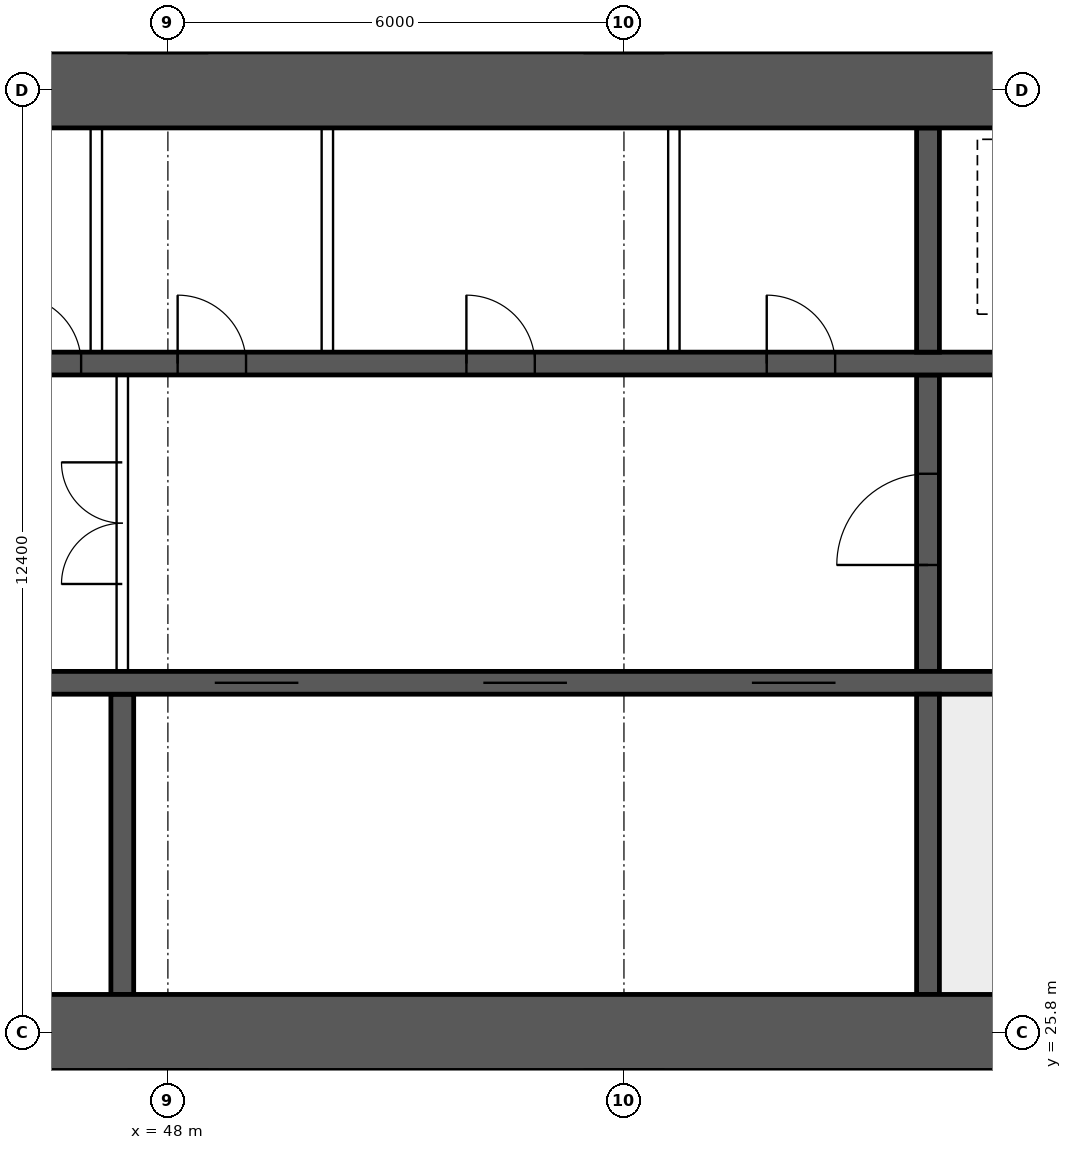
"""IFC4 building model, lengths in metres.
Left out: names, types, materials, properties, quantities, classifications, styles, units other than length and angle.
Written with IfcOpenShell. Run it as: python <this file> out.ifc"""

import sys

from ifc_helpers import new_model, si_unit, direction, frame, frame_2d, origin, place, context, subcontext, project, spatial, rectangle, extrude, element, fill, save


model = new_model("IFC4")
c1 = context("Model", 3, precision=1e-05, world=origin(), true_north=direction((0.0, 1.0)))
c2 = subcontext(c1, "Body", "Model", "MODEL_VIEW")
j1 = project(units=[si_unit("LENGTHUNIT", "METRE"), si_unit("PLANEANGLEUNIT", "RADIAN")], contexts=[c1])
p1 = place(None, origin())
s1 = spatial("IfcSite", under=j1, at=p1, CompositionType="ELEMENT")
p2 = place(p1, origin())
s2 = spatial("IfcBuilding", under=s1, at=p2, CompositionType="ELEMENT")
p3 = place(p2, frame((0.0, 0.0, 53.95)))
s3 = spatial("IfcBuildingStorey", under=s2, at=p3, CompositionType="ELEMENT", Elevation=53.95)
for number, where, z_axis, x_axis in (
    (1, (18.0, 25.8, 0.0), (0.0, 0.0, 1.0), (1.0, 0.0, 0.0)),
    (2, (18.0, 38.2, 0.0), (0.0, 0.0, 1.0), (1.0, 0.0, 0.0)),
):
    element("IfcWall", number, at=place(p3, frame(where, z_axis=z_axis, x_axis=x_axis)), inside=s3, PredefinedType="SHEAR", context=c2, shape_type="SweptSolid", body=[
        extrude(rectangle(XDim=48.0, YDim=1.0, at=frame_2d((24.0, 0.0))), origin(), (0.0, 0.0, 1.0), 3.75),
    ])
p4 = place(p3, frame((18.5, 30.4, 0.0), z_axis=(0.0, 0.0, 1.0), x_axis=(1.0, 0.0, 0.0)))
e3 = element("IfcWall", 3, at=p4, inside=s3, PredefinedType="SHEAR", context=c2, shape_type="SweptSolid", body=[
    extrude(rectangle(XDim=47.0, YDim=0.3, at=frame_2d((23.5, 0.0))), origin(), (0.0, 0.0, 1.0), 3.75),
])
p5 = place(p4, frame((0.4, 0.0, 0.0)))
e4 = element("IfcOpeningElement", 4, at=p5, cuts=e3, PredefinedType="OPENING", context=c2, shape_type="SweptSolid", body=[
    extrude(rectangle(XDim=1.0, YDim=2.1, at=frame_2d((0.5, 1.05))), frame((0.0, 0.16, 0.0), z_axis=(0.0, -1.0, 0.0), x_axis=(1.0, 0.0, 0.0)), (0.0, 0.0, 1.0), 0.32),
])
p6 = place(p4, frame((45.6, 0.0, 0.0)))
e5 = element("IfcOpeningElement", 5, at=p6, cuts=e3, PredefinedType="OPENING", context=c2, shape_type="SweptSolid", body=[
    extrude(rectangle(XDim=1.0, YDim=2.1, at=frame_2d((0.5, 1.05))), frame((0.0, 0.16, 0.0), z_axis=(0.0, -1.0, 0.0), x_axis=(1.0, 0.0, 0.0)), (0.0, 0.0, 1.0), 0.32),
])
p7 = place(p4, frame((8.25, 0.0, 0.0)))
e6 = element("IfcOpeningElement", 6, at=p7, cuts=e3, PredefinedType="OPENING", context=c2, shape_type="SweptSolid", body=[
    extrude(rectangle(XDim=1.1, YDim=2.1, at=frame_2d((0.55, 1.05))), frame((0.0, 0.16, 0.0), z_axis=(0.0, -1.0, 0.0), x_axis=(1.0, 0.0, 0.0)), (0.0, 0.0, 1.0), 0.32),
])
p8 = place(p4, frame((10.85, 0.0, 0.0)))
e7 = element("IfcOpeningElement", 7, at=p8, cuts=e3, PredefinedType="OPENING", context=c2, shape_type="SweptSolid", body=[
    extrude(rectangle(XDim=1.1, YDim=2.1, at=frame_2d((0.55, 1.05))), frame((0.0, 0.16, 0.0), z_axis=(0.0, -1.0, 0.0), x_axis=(1.0, 0.0, 0.0)), (0.0, 0.0, 1.0), 0.32),
])
p9 = place(p4, frame((13.45, 0.0, 0.0)))
e8 = element("IfcOpeningElement", 8, at=p9, cuts=e3, PredefinedType="OPENING", context=c2, shape_type="SweptSolid", body=[
    extrude(rectangle(XDim=1.1, YDim=2.1, at=frame_2d((0.55, 1.05))), frame((0.0, 0.16, 0.0), z_axis=(0.0, -1.0, 0.0), x_axis=(1.0, 0.0, 0.0)), (0.0, 0.0, 1.0), 0.32),
])
p10 = place(p4, frame((16.05, 0.0, 0.0)))
e9 = element("IfcOpeningElement", 9, at=p10, cuts=e3, PredefinedType="OPENING", context=c2, shape_type="SweptSolid", body=[
    extrude(rectangle(XDim=1.1, YDim=2.1, at=frame_2d((0.55, 1.05))), frame((0.0, 0.16, 0.0), z_axis=(0.0, -1.0, 0.0), x_axis=(1.0, 0.0, 0.0)), (0.0, 0.0, 1.0), 0.32),
])
p11 = place(p4, frame((30.117, 0.0, 0.0)))
e10 = element("IfcOpeningElement", 10, at=p11, cuts=e3, PredefinedType="OPENING", context=c2, shape_type="SweptSolid", body=[
    extrude(rectangle(XDim=1.1, YDim=2.1, at=frame_2d((0.55, 1.05))), frame((0.0, 0.16, 0.0), z_axis=(0.0, -1.0, 0.0), x_axis=(1.0, 0.0, 0.0)), (0.0, 0.0, 1.0), 0.32),
])
p12 = place(p4, frame((33.65, 0.0, 0.0)))
e11 = element("IfcOpeningElement", 11, at=p12, cuts=e3, PredefinedType="OPENING", context=c2, shape_type="SweptSolid", body=[
    extrude(rectangle(XDim=1.1, YDim=2.1, at=frame_2d((0.55, 1.05))), frame((0.0, 0.16, 0.0), z_axis=(0.0, -1.0, 0.0), x_axis=(1.0, 0.0, 0.0)), (0.0, 0.0, 1.0), 0.32),
])
p13 = place(p4, frame((37.183, 0.0, 0.0)))
e12 = element("IfcOpeningElement", 12, at=p13, cuts=e3, PredefinedType="OPENING", context=c2, shape_type="SweptSolid", body=[
    extrude(rectangle(XDim=1.1, YDim=2.1, at=frame_2d((0.55, 1.05))), frame((0.0, 0.16, 0.0), z_axis=(0.0, -1.0, 0.0), x_axis=(1.0, 0.0, 0.0)), (0.0, 0.0, 1.0), 0.32),
])
p14 = place(p3, frame((18.5, 34.6, 0.0), z_axis=(0.0, 0.0, 1.0), x_axis=(1.0, 0.0, 0.0)))
e13 = element("IfcWall", 13, at=p14, inside=s3, PredefinedType="SHEAR", context=c2, shape_type="SweptSolid", body=[
    extrude(rectangle(XDim=47.0, YDim=0.3, at=frame_2d((23.5, 0.0))), origin(), (0.0, 0.0, 1.0), 3.75),
])
p15 = place(p14, frame((0.9, 0.0, 0.0)))
e14 = element("IfcOpeningElement", 14, at=p15, cuts=e13, PredefinedType="OPENING", context=c2, shape_type="SweptSolid", body=[
    extrude(rectangle(XDim=1.1, YDim=2.1, at=frame_2d((0.55, 1.05))), frame((0.0, 0.16, 0.0), z_axis=(0.0, -1.0, 0.0), x_axis=(1.0, 0.0, 0.0)), (0.0, 0.0, 1.0), 0.32),
])
p16 = place(p14, frame((45.0, 0.0, 0.0)))
e15 = element("IfcOpeningElement", 15, at=p16, cuts=e13, PredefinedType="OPENING", context=c2, shape_type="SweptSolid", body=[
    extrude(rectangle(XDim=1.1, YDim=2.1, at=frame_2d((0.55, 1.05))), frame((0.0, 0.16, 0.0), z_axis=(0.0, -1.0, 0.0), x_axis=(1.0, 0.0, 0.0)), (0.0, 0.0, 1.0), 0.32),
])
p17 = place(p14, frame((4.1, 0.0, 0.0)))
e16 = element("IfcOpeningElement", 16, at=p17, cuts=e13, PredefinedType="OPENING", context=c2, shape_type="SweptSolid", body=[
    extrude(rectangle(XDim=0.9, YDim=2.1, at=frame_2d((0.45, 1.05))), frame((0.0, 0.16, 0.0), z_axis=(0.0, -1.0, 0.0), x_axis=(1.0, 0.0, 0.0)), (0.0, 0.0, 1.0), 0.32),
])
p18 = place(p14, frame((42.0, 0.0, 0.0)))
e17 = element("IfcOpeningElement", 17, at=p18, cuts=e13, PredefinedType="OPENING", context=c2, shape_type="SweptSolid", body=[
    extrude(rectangle(XDim=0.9, YDim=2.1, at=frame_2d((0.45, 1.05))), frame((0.0, 0.16, 0.0), z_axis=(0.0, -1.0, 0.0), x_axis=(1.0, 0.0, 0.0)), (0.0, 0.0, 1.0), 0.32),
])
p19 = place(p14, frame((8.875, 0.0, 0.0)))
e18 = element("IfcOpeningElement", 18, at=p19, cuts=e13, PredefinedType="OPENING", context=c2, shape_type="SweptSolid", body=[
    extrude(rectangle(XDim=0.9, YDim=2.1, at=frame_2d((0.45, 1.05))), frame((0.0, 0.16, 0.0), z_axis=(0.0, -1.0, 0.0), x_axis=(1.0, 0.0, 0.0)), (0.0, 0.0, 1.0), 0.32),
])
p20 = place(p14, frame((12.849, 0.0, 0.0)))
e19 = element("IfcOpeningElement", 19, at=p20, cuts=e13, PredefinedType="OPENING", context=c2, shape_type="SweptSolid", body=[
    extrude(rectangle(XDim=0.9, YDim=2.1, at=frame_2d((0.45, 1.05))), frame((0.0, 0.16, 0.0), z_axis=(0.0, -1.0, 0.0), x_axis=(1.0, 0.0, 0.0)), (0.0, 0.0, 1.0), 0.32),
])
p21 = place(p14, frame((16.496, 0.0, 0.0)))
e20 = element("IfcOpeningElement", 20, at=p21, cuts=e13, PredefinedType="OPENING", context=c2, shape_type="SweptSolid", body=[
    extrude(rectangle(XDim=0.9, YDim=2.1, at=frame_2d((0.45, 1.05))), frame((0.0, 0.16, 0.0), z_axis=(0.0, -1.0, 0.0), x_axis=(1.0, 0.0, 0.0)), (0.0, 0.0, 1.0), 0.32),
])
p22 = place(p14, frame((20.255, 0.0, 0.0)))
e21 = element("IfcOpeningElement", 21, at=p22, cuts=e13, PredefinedType="OPENING", context=c2, shape_type="SweptSolid", body=[
    extrude(rectangle(XDim=0.9, YDim=2.1, at=frame_2d((0.45, 1.05))), frame((0.0, 0.16, 0.0), z_axis=(0.0, -1.0, 0.0), x_axis=(1.0, 0.0, 0.0)), (0.0, 0.0, 1.0), 0.32),
])
p23 = place(p14, frame((24.661, 0.0, 0.0)))
e22 = element("IfcOpeningElement", 22, at=p23, cuts=e13, PredefinedType="OPENING", context=c2, shape_type="SweptSolid", body=[
    extrude(rectangle(XDim=0.9, YDim=2.1, at=frame_2d((0.45, 1.05))), frame((0.0, 0.16, 0.0), z_axis=(0.0, -1.0, 0.0), x_axis=(1.0, 0.0, 0.0)), (0.0, 0.0, 1.0), 0.32),
])
p24 = place(p14, frame((27.458, 0.0, 0.0)))
e23 = element("IfcOpeningElement", 23, at=p24, cuts=e13, PredefinedType="OPENING", context=c2, shape_type="SweptSolid", body=[
    extrude(rectangle(XDim=0.9, YDim=2.1, at=frame_2d((0.45, 1.05))), frame((0.0, 0.16, 0.0), z_axis=(0.0, -1.0, 0.0), x_axis=(1.0, 0.0, 0.0)), (0.0, 0.0, 1.0), 0.32),
])
p25 = place(p14, frame((29.628, 0.0, 0.0)))
e24 = element("IfcOpeningElement", 24, at=p25, cuts=e13, PredefinedType="OPENING", context=c2, shape_type="SweptSolid", body=[
    extrude(rectangle(XDim=0.9, YDim=2.1, at=frame_2d((0.45, 1.05))), frame((0.0, 0.16, 0.0), z_axis=(0.0, -1.0, 0.0), x_axis=(1.0, 0.0, 0.0)), (0.0, 0.0, 1.0), 0.32),
])
p26 = place(p14, frame((33.427, 0.0, 0.0)))
e25 = element("IfcOpeningElement", 25, at=p26, cuts=e13, PredefinedType="OPENING", context=c2, shape_type="SweptSolid", body=[
    extrude(rectangle(XDim=0.9, YDim=2.1, at=frame_2d((0.45, 1.05))), frame((0.0, 0.16, 0.0), z_axis=(0.0, -1.0, 0.0), x_axis=(1.0, 0.0, 0.0)), (0.0, 0.0, 1.0), 0.32),
])
p27 = place(p14, frame((37.378, 0.0, 0.0)))
e26 = element("IfcOpeningElement", 26, at=p27, cuts=e13, PredefinedType="OPENING", context=c2, shape_type="SweptSolid", body=[
    extrude(rectangle(XDim=0.9, YDim=2.1, at=frame_2d((0.45, 1.05))), frame((0.0, 0.16, 0.0), z_axis=(0.0, -1.0, 0.0), x_axis=(1.0, 0.0, 0.0)), (0.0, 0.0, 1.0), 0.32),
])
p28 = place(p3, frame((58.0, 26.3, 0.0), z_axis=(0.0, 0.0, 1.0), x_axis=(0.0, 1.0, 0.0)))
e27 = element("IfcWall", 27, at=p28, inside=s3, PredefinedType="SHEAR", context=c2, shape_type="SweptSolid", body=[
    extrude(rectangle(XDim=3.95, YDim=0.3, at=frame_2d((1.975, 0.0))), origin(), (0.0, 0.0, 1.0), 3.75),
])
p29 = place(p3, frame((58.0, 30.55, 0.0), z_axis=(0.0, 0.0, 1.0), x_axis=(0.0, 1.0, 0.0)))
e28 = element("IfcWall", 28, at=p29, inside=s3, PredefinedType="SHEAR", context=c2, shape_type="SweptSolid", body=[
    extrude(rectangle(XDim=3.9, YDim=0.3, at=frame_2d((1.95, 0.0))), origin(), (0.0, 0.0, 1.0), 3.75),
])
p30 = place(p29, frame((1.4, 0.0, 0.0)))
e29 = element("IfcOpeningElement", 29, at=p30, cuts=e28, PredefinedType="OPENING", context=c2, shape_type="SweptSolid", body=[
    extrude(rectangle(XDim=1.2, YDim=2.1, at=frame_2d((0.6, 1.05))), frame((0.0, 0.16, 0.0), z_axis=(0.0, -1.0, 0.0), x_axis=(1.0, 0.0, 0.0)), (0.0, 0.0, 1.0), 0.32),
])
p31 = place(p3, frame((58.0, 34.75, 0.0), z_axis=(0.0, 0.0, 1.0), x_axis=(0.0, 1.0, 0.0)))
e30 = element("IfcWall", 30, at=p31, inside=s3, PredefinedType="SHEAR", context=c2, shape_type="SweptSolid", body=[
    extrude(rectangle(XDim=2.95, YDim=0.3, at=frame_2d((1.475, 0.0))), origin(), (0.0, 0.0, 1.0), 3.75),
])
p32 = place(p3, frame((47.4, 26.3, 0.0), z_axis=(0.0, 0.0, 1.0), x_axis=(0.0, 1.0, 0.0)))
e31 = element("IfcWall", 31, at=p32, inside=s3, PredefinedType="SHEAR", context=c2, shape_type="SweptSolid", body=[
    extrude(rectangle(XDim=3.95, YDim=0.3, at=frame_2d((1.975, 0.0))), origin(), (0.0, 0.0, 1.0), 3.75),
])
p33 = place(p3, frame((47.4, 30.55, 0.0), z_axis=(0.0, 0.0, 1.0), x_axis=(0.0, 1.0, 0.0)))
e32 = element("IfcWall", 32, at=p33, inside=s3, PredefinedType="SOLIDWALL", context=c2, shape_type="SweptSolid", body=[
    extrude(rectangle(XDim=3.9, YDim=0.15, at=frame_2d((1.95, 0.0))), origin(), (0.0, 0.0, 1.0), 3.5),
])
p34 = place(p33, frame((1.15, 0.0, 0.0)))
e33 = element("IfcOpeningElement", 33, at=p34, cuts=e32, PredefinedType="OPENING", context=c2, shape_type="SweptSolid", body=[
    extrude(rectangle(XDim=1.6, YDim=2.1, at=frame_2d((0.8, 1.05))), frame((0.0, 0.085, 0.0), z_axis=(0.0, -1.0, 0.0), x_axis=(1.0, 0.0, 0.0)), (0.0, 0.0, 1.0), 0.17),
])
for number, where, z_axis, x_axis in (
    (34, (47.058, 34.75, 0.0), (0.0, 0.0, 1.0), (0.0, 1.0, 0.0)),
    (35, (50.098, 34.75, 0.0), (0.0, 0.0, 1.0), (0.0, 1.0, 0.0)),
    (36, (54.657, 34.75, 0.0), (0.0, 0.0, 1.0), (0.0, 1.0, 0.0)),
):
    element("IfcWall", number, at=place(p3, frame(where, z_axis=z_axis, x_axis=x_axis)), inside=s3, PredefinedType="SOLIDWALL", context=c2, shape_type="SweptSolid", body=[
        extrude(rectangle(XDim=2.95, YDim=0.15, at=frame_2d((1.475, 0.0))), origin(), (0.0, 0.0, 1.0), 3.5),
    ])
p35 = place(p3, frame((56.66, 14.9, 0.0), z_axis=(0.0, 0.0, 1.0), x_axis=(0.0, 1.0, 0.0)))
e37 = element("IfcWall", 37, at=p35, inside=s3, PredefinedType="PARTITIONING", context=c2, shape_type="SweptSolid", body=[
    extrude(rectangle(XDim=10.4, YDim=0.15, at=frame_2d((5.2, 0.0))), origin(), (0.0, 0.0, 1.0), 3.5),
])
p36 = place(p34, origin())
e38 = element("IfcDoor", 38, at=p36, inside=s3, OperationType="DOUBLE_DOOR_SINGLE_SWING", PredefinedType="DOOR", context=c2, shape_type="SweptSolid", body=[
    extrude(rectangle(XDim=1.6, YDim=2.1, at=frame_2d((0.8, 1.05))), frame((0.0, 0.025, 0.0), z_axis=(0.0, -1.0, 0.0), x_axis=(1.0, 0.0, 0.0)), (0.0, 0.0, 1.0), 0.05),
])
fill(e33, e38)
p37 = place(p30, origin())
e39 = element("IfcDoor", 39, at=p37, inside=s3, OperationType="SINGLE_SWING_LEFT", PredefinedType="DOOR", context=c2, shape_type="SweptSolid", body=[
    extrude(rectangle(XDim=1.2, YDim=2.1, at=frame_2d((0.6, 1.05))), frame((0.0, 0.025, 0.0), z_axis=(0.0, -1.0, 0.0), x_axis=(1.0, 0.0, 0.0)), (0.0, 0.0, 1.0), 0.05),
])
fill(e29, e39)
p38 = place(p24, origin())
e40 = element("IfcDoor", 40, at=p38, inside=s3, OperationType="SINGLE_SWING_LEFT", PredefinedType="DOOR", context=c2, shape_type="SweptSolid", body=[
    extrude(rectangle(XDim=0.9, YDim=2.1, at=frame_2d((0.45, 1.05))), frame((0.0, 0.025, 0.0), z_axis=(0.0, -1.0, 0.0), x_axis=(1.0, 0.0, 0.0)), (0.0, 0.0, 1.0), 0.05),
])
fill(e23, e40)
p39 = place(p25, origin())
e41 = element("IfcDoor", 41, at=p39, inside=s3, OperationType="SINGLE_SWING_LEFT", PredefinedType="DOOR", context=c2, shape_type="SweptSolid", body=[
    extrude(rectangle(XDim=0.9, YDim=2.1, at=frame_2d((0.45, 1.05))), frame((0.0, 0.025, 0.0), z_axis=(0.0, -1.0, 0.0), x_axis=(1.0, 0.0, 0.0)), (0.0, 0.0, 1.0), 0.05),
])
fill(e24, e41)
p40 = place(p26, origin())
e42 = element("IfcDoor", 42, at=p40, inside=s3, OperationType="SINGLE_SWING_LEFT", PredefinedType="DOOR", context=c2, shape_type="SweptSolid", body=[
    extrude(rectangle(XDim=0.9, YDim=2.1, at=frame_2d((0.45, 1.05))), frame((0.0, 0.025, 0.0), z_axis=(0.0, -1.0, 0.0), x_axis=(1.0, 0.0, 0.0)), (0.0, 0.0, 1.0), 0.05),
])
fill(e25, e42)
p41 = place(p27, origin())
e43 = element("IfcDoor", 43, at=p41, inside=s3, OperationType="SINGLE_SWING_LEFT", PredefinedType="DOOR", context=c2, shape_type="SweptSolid", body=[
    extrude(rectangle(XDim=0.9, YDim=2.1, at=frame_2d((0.45, 1.05))), frame((0.0, 0.025, 0.0), z_axis=(0.0, -1.0, 0.0), x_axis=(1.0, 0.0, 0.0)), (0.0, 0.0, 1.0), 0.05),
])
fill(e26, e43)
p42 = place(p11, origin())
e44 = element("IfcDoor", 44, at=p42, inside=s3, OperationType="DOUBLE_DOOR_SLIDING", PredefinedType="DOOR", context=c2, shape_type="SweptSolid", body=[
    extrude(rectangle(XDim=1.1, YDim=2.1, at=frame_2d((0.55, 1.05))), frame((0.0, 0.025, 0.0), z_axis=(0.0, -1.0, 0.0), x_axis=(1.0, 0.0, 0.0)), (0.0, 0.0, 1.0), 0.05),
])
fill(e10, e44)
p43 = place(p12, origin())
e45 = element("IfcDoor", 45, at=p43, inside=s3, OperationType="DOUBLE_DOOR_SLIDING", PredefinedType="DOOR", context=c2, shape_type="SweptSolid", body=[
    extrude(rectangle(XDim=1.1, YDim=2.1, at=frame_2d((0.55, 1.05))), frame((0.0, 0.025, 0.0), z_axis=(0.0, -1.0, 0.0), x_axis=(1.0, 0.0, 0.0)), (0.0, 0.0, 1.0), 0.05),
])
fill(e11, e45)
p44 = place(p13, origin())
e46 = element("IfcDoor", 46, at=p44, inside=s3, OperationType="DOUBLE_DOOR_SLIDING", PredefinedType="DOOR", context=c2, shape_type="SweptSolid", body=[
    extrude(rectangle(XDim=1.1, YDim=2.1, at=frame_2d((0.55, 1.05))), frame((0.0, 0.025, 0.0), z_axis=(0.0, -1.0, 0.0), x_axis=(1.0, 0.0, 0.0)), (0.0, 0.0, 1.0), 0.05),
])
fill(e12, e46)
save(model, sys.argv[1])
